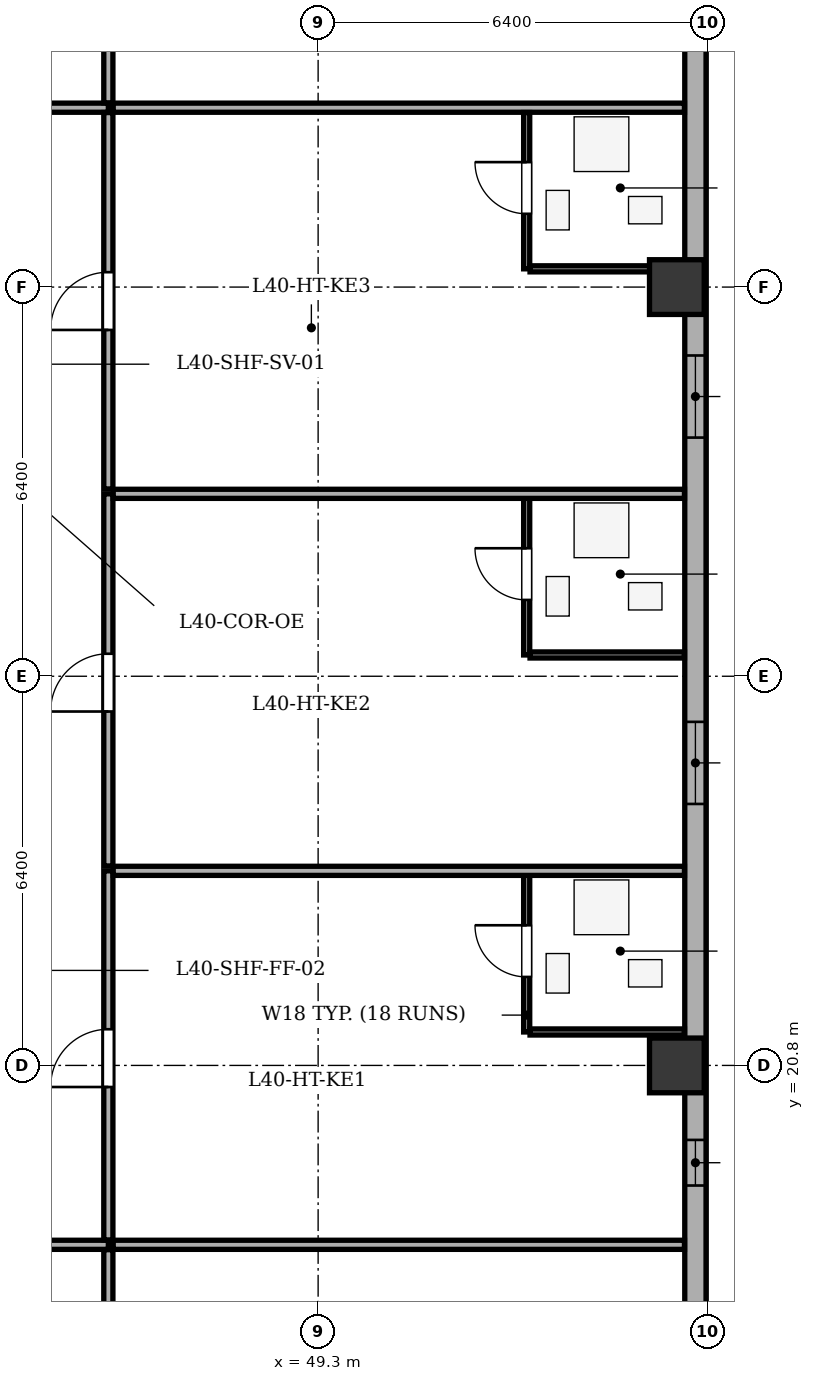
"""IFC4 building model, lengths in metres.
Left out: names, types, materials, properties, quantities, classifications, styles, units other than length and angle.
Written with IfcOpenShell. Run it as: python <this file> out.ifc"""

import sys

from ifc_helpers import new_model, si_unit, direction, frame, frame_2d, origin, origin_2d, place, context, subcontext, project, spatial, rectangle, extrude, element, fill, save


model = new_model("IFC4")
c1 = context("Model", 3, precision=1e-05, world=origin(), true_north=direction((0.0, 1.0)))
c2 = subcontext(c1, "Body", "Model", "MODEL_VIEW")
j1 = project(units=[si_unit("LENGTHUNIT", "METRE"), si_unit("PLANEANGLEUNIT", "RADIAN")], contexts=[c1])
p1 = place(None, origin())
s1 = spatial("IfcSite", under=j1, at=p1, CompositionType="ELEMENT")
p2 = place(p1, origin())
s2 = spatial("IfcBuilding", under=s1, at=p2, CompositionType="ELEMENT")
p3 = place(p2, frame((0.0, 0.0, 158.8)))
s3 = spatial("IfcBuildingStorey", under=s2, at=p3, CompositionType="ELEMENT", Elevation=158.8)
for number, where, z_axis, x_axis in (
    (1, (55.2, 20.8, 0.0), (0.0, 0.0, 1.0), (1.0, 0.0, 0.0)),
    (2, (55.2, 33.6, 0.0), (0.0, 0.0, 1.0), (1.0, 0.0, 0.0)),
):
    element("IfcColumn", number, at=place(p3, frame(where, z_axis=z_axis, x_axis=x_axis)), inside=s3, PredefinedType="COLUMN", context=c2, shape_type="SweptSolid", body=[
        extrude(rectangle(XDim=0.9, YDim=0.9, at=origin_2d()), origin(), (0.0, 0.0, 1.0), 3.5),
    ])
p4 = place(p3, frame((55.505, 41.5, 0.0), z_axis=(0.0, 0.0, 1.0), x_axis=(0.0, -1.0, 0.0)))
e3 = element("IfcWall", 3, at=p4, inside=s3, PredefinedType="STANDARD", context=c2, shape_type="SweptSolid", body=[
    extrude(rectangle(XDim=35.0, YDim=0.35, at=frame_2d((17.5, 0.0))), origin(), (0.0, 0.0, 1.0), 2.435),
])
p5 = place(p4, frame((1.813, 0.0, 0.75)))
e4 = element("IfcOpeningElement", 4, at=p5, cuts=e3, PredefinedType="OPENING", context=c2, shape_type="SweptSolid", body=[
    extrude(rectangle(XDim=1.6, YDim=1.565, at=frame_2d((0.8, 0.782))), frame((0.0, 0.185, 0.0), z_axis=(0.0, -1.0, 0.0), x_axis=(1.0, 0.0, 0.0)), (0.0, 0.0, 1.0), 0.37),
])
p6 = place(p4, frame((9.025, 0.0, 0.75)))
e5 = element("IfcOpeningElement", 5, at=p6, cuts=e3, PredefinedType="OPENING", context=c2, shape_type="SweptSolid", body=[
    extrude(rectangle(XDim=1.35, YDim=1.565, at=frame_2d((0.675, 0.782))), frame((0.0, 0.185, 0.0), z_axis=(0.0, -1.0, 0.0), x_axis=(1.0, 0.0, 0.0)), (0.0, 0.0, 1.0), 0.37),
])
p7 = place(p4, frame((15.05, 0.0, 0.75)))
e6 = element("IfcOpeningElement", 6, at=p7, cuts=e3, PredefinedType="OPENING", context=c2, shape_type="SweptSolid", body=[
    extrude(rectangle(XDim=1.35, YDim=1.565, at=frame_2d((0.675, 0.782))), frame((0.0, 0.185, 0.0), z_axis=(0.0, -1.0, 0.0), x_axis=(1.0, 0.0, 0.0)), (0.0, 0.0, 1.0), 0.37),
])
p8 = place(p4, frame((25.175, 0.0, 0.75)))
e7 = element("IfcOpeningElement", 7, at=p8, cuts=e3, PredefinedType="OPENING", context=c2, shape_type="SweptSolid", body=[
    extrude(rectangle(XDim=1.6, YDim=1.565, at=frame_2d((0.8, 0.782))), frame((0.0, 0.185, 0.0), z_axis=(0.0, -1.0, 0.0), x_axis=(1.0, 0.0, 0.0)), (0.0, 0.0, 1.0), 0.37),
])
p9 = place(p4, frame((31.012, 0.0, 0.75)))
e8 = element("IfcOpeningElement", 8, at=p9, cuts=e3, PredefinedType="OPENING", context=c2, shape_type="SweptSolid", body=[
    extrude(rectangle(XDim=1.6, YDim=1.565, at=frame_2d((0.8, 0.782))), frame((0.0, 0.185, 0.0), z_axis=(0.0, -1.0, 0.0), x_axis=(1.0, 0.0, 0.0)), (0.0, 0.0, 1.0), 0.37),
])
p10 = place(p4, frame((21.925, 0.0, 0.75)))
e9 = element("IfcOpeningElement", 9, at=p10, cuts=e3, PredefinedType="OPENING", context=c2, shape_type="SweptSolid", body=[
    extrude(rectangle(XDim=0.75, YDim=1.45, at=frame_2d((0.375, 0.725))), frame((0.0, 0.185, 0.0), z_axis=(0.0, -1.0, 0.0), x_axis=(1.0, 0.0, 0.0)), (0.0, 0.0, 1.0), 0.37),
])
p11 = place(p3, frame((42.073, 17.85, 0.0), z_axis=(0.0, 0.0, 1.0), x_axis=(1.0, 0.0, 0.0)))
e10 = element("IfcWall", 10, at=p11, inside=s3, PredefinedType="PARTITIONING", context=c2, shape_type="SweptSolid", body=[
    extrude(rectangle(XDim=3.777, YDim=0.15, at=frame_2d((1.889, 0.0))), origin(), (0.0, 0.0, 1.0), 3.05),
])
p12 = place(p11, frame((1.409, 0.0, 0.0)))
e11 = element("IfcOpeningElement", 11, at=p12, cuts=e10, PredefinedType="OPENING", context=c2, shape_type="SweptSolid", body=[
    extrude(rectangle(XDim=0.95, YDim=2.1, at=frame_2d((0.475, 1.05))), frame((0.0, 0.085, 0.0), z_axis=(0.0, -1.0, 0.0), x_axis=(1.0, 0.0, 0.0)), (0.0, 0.0, 1.0), 0.17),
])
p13 = place(p3, frame((45.85, 1.875, 0.0), z_axis=(0.0, 0.0, 1.0), x_axis=(0.0, 1.0, 0.0)))
e12 = element("IfcWall", 12, at=p13, inside=s3, PredefinedType="PARTITIONING", context=c2, shape_type="SweptSolid", body=[
    extrude(rectangle(XDim=15.895, YDim=0.15, at=frame_2d((7.948, 0.0))), origin(), (0.0, 0.0, 1.0), 3.05),
])
p14 = place(p3, frame((32.664, 36.55, 0.0), z_axis=(0.0, 0.0, 1.0), x_axis=(1.0, 0.0, 0.0)))
e13 = element("IfcWall", 13, at=p14, inside=s3, PredefinedType="PARTITIONING", context=c2, shape_type="SweptSolid", body=[
    extrude(rectangle(XDim=13.186, YDim=0.15, at=frame_2d((6.593, 0.0))), origin(), (0.0, 0.0, 1.0), 3.05),
])
p15 = place(p14, frame((6.033, 0.0, 0.0)))
e14 = element("IfcOpeningElement", 14, at=p15, cuts=e13, PredefinedType="OPENING", context=c2, shape_type="SweptSolid", body=[
    extrude(rectangle(XDim=1.0, YDim=2.1, at=frame_2d((0.5, 1.05))), frame((0.0, 0.085, 0.0), z_axis=(0.0, -1.0, 0.0), x_axis=(1.0, 0.0, 0.0)), (0.0, 0.0, 1.0), 0.17),
])
p16 = place(p3, frame((45.85, 36.63, 0.0), z_axis=(0.0, 0.0, 1.0), x_axis=(0.0, 1.0, 0.0)))
e15 = element("IfcWall", 15, at=p16, inside=s3, PredefinedType="PARTITIONING", context=c2, shape_type="SweptSolid", body=[
    extrude(rectangle(XDim=9.495, YDim=0.15, at=frame_2d((4.748, 0.0))), origin(), (0.0, 0.0, 1.0), 3.05),
])
for number, where, z_axis, x_axis in (
    (16, (45.93, 17.85, 0.0), (0.0, 0.0, 1.0), (1.0, 0.0, 0.0)),
    (17, (45.93, 36.55, 0.0), (0.0, 0.0, 1.0), (1.0, 0.0, 0.0)),
):
    element("IfcWall", number, at=place(p3, frame(where, z_axis=z_axis, x_axis=x_axis)), inside=s3, PredefinedType="PARTITIONING", context=c2, shape_type="SweptSolid", body=[
        extrude(rectangle(XDim=9.395, YDim=0.15, at=frame_2d((4.698, 0.0))), origin(), (0.0, 0.0, 1.0), 3.05),
    ])
p17 = place(p3, frame((45.85, 17.93, 0.0), z_axis=(0.0, 0.0, 1.0), x_axis=(0.0, 1.0, 0.0)))
e18 = element("IfcWall", 18, at=p17, inside=s3, PredefinedType="PARTITIONING", context=c2, shape_type="SweptSolid", body=[
    extrude(rectangle(XDim=6.07, YDim=0.15, at=frame_2d((3.035, 0.0))), origin(), (0.0, 0.0, 1.0), 3.05),
])
p18 = place(p17, frame((2.515, 0.0, 0.0)))
e19 = element("IfcOpeningElement", 19, at=p18, cuts=e18, PredefinedType="OPENING", context=c2, shape_type="SweptSolid", body=[
    extrude(rectangle(XDim=0.95, YDim=2.1, at=frame_2d((0.475, 1.05))), frame((0.0, 0.085, 0.0), z_axis=(0.0, -1.0, 0.0), x_axis=(1.0, 0.0, 0.0)), (0.0, 0.0, 1.0), 0.17),
])
p19 = place(p3, frame((52.73, 21.35, 0.0), z_axis=(0.0, 0.0, 1.0), x_axis=(0.0, 1.0, 0.0)))
e20 = element("IfcWall", 20, at=p19, inside=s3, PredefinedType="PARTITIONING", context=c2, shape_type="SweptSolid", body=[
    extrude(rectangle(XDim=2.65, YDim=0.1, at=frame_2d((1.325, 0.0))), origin(), (0.0, 0.0, 1.0), 3.05),
])
p20 = place(p19, frame((0.905, 0.0, 0.0)))
e21 = element("IfcOpeningElement", 21, at=p20, cuts=e20, PredefinedType="OPENING", context=c2, shape_type="SweptSolid", body=[
    extrude(rectangle(XDim=0.85, YDim=2.05, at=frame_2d((0.425, 1.025))), frame((0.0, 0.06, 0.0), z_axis=(0.0, -1.0, 0.0), x_axis=(1.0, 0.0, 0.0)), (0.0, 0.0, 1.0), 0.12),
])
p21 = place(p3, frame((52.785, 21.35, 0.0), z_axis=(0.0, 0.0, 1.0), x_axis=(1.0, 0.0, 0.0)))
e22 = element("IfcWall", 22, at=p21, inside=s3, PredefinedType="PARTITIONING", context=c2, shape_type="SweptSolid", body=[
    extrude(rectangle(XDim=2.54, YDim=0.1, at=frame_2d((1.27, 0.0))), origin(), (0.0, 0.0, 1.0), 3.05),
])
p22 = place(p3, frame((45.93, 24.0, 0.0), z_axis=(0.0, 0.0, 1.0), x_axis=(1.0, 0.0, 0.0)))
e23 = element("IfcWall", 23, at=p22, inside=s3, PredefinedType="PARTITIONING", context=c2, shape_type="SweptSolid", body=[
    extrude(rectangle(XDim=9.395, YDim=0.15, at=frame_2d((4.698, 0.0))), origin(), (0.0, 0.0, 1.0), 3.05),
])
p23 = place(p3, frame((45.85, 24.08, 0.0), z_axis=(0.0, 0.0, 1.0), x_axis=(0.0, 1.0, 0.0)))
e24 = element("IfcWall", 24, at=p23, inside=s3, PredefinedType="PARTITIONING", context=c2, shape_type="SweptSolid", body=[
    extrude(rectangle(XDim=6.12, YDim=0.15, at=frame_2d((3.06, 0.0))), origin(), (0.0, 0.0, 1.0), 3.05),
])
p24 = place(p23, frame((2.54, 0.0, 0.0)))
e25 = element("IfcOpeningElement", 25, at=p24, cuts=e24, PredefinedType="OPENING", context=c2, shape_type="SweptSolid", body=[
    extrude(rectangle(XDim=0.95, YDim=2.1, at=frame_2d((0.475, 1.05))), frame((0.0, 0.085, 0.0), z_axis=(0.0, -1.0, 0.0), x_axis=(1.0, 0.0, 0.0)), (0.0, 0.0, 1.0), 0.17),
])
p25 = place(p3, frame((52.73, 27.55, 0.0), z_axis=(0.0, 0.0, 1.0), x_axis=(0.0, 1.0, 0.0)))
e26 = element("IfcWall", 26, at=p25, inside=s3, PredefinedType="PARTITIONING", context=c2, shape_type="SweptSolid", body=[
    extrude(rectangle(XDim=2.65, YDim=0.1, at=frame_2d((1.325, 0.0))), origin(), (0.0, 0.0, 1.0), 3.05),
])
p26 = place(p25, frame((0.905, 0.0, 0.0)))
e27 = element("IfcOpeningElement", 27, at=p26, cuts=e26, PredefinedType="OPENING", context=c2, shape_type="SweptSolid", body=[
    extrude(rectangle(XDim=0.85, YDim=2.05, at=frame_2d((0.425, 1.025))), frame((0.0, 0.06, 0.0), z_axis=(0.0, -1.0, 0.0), x_axis=(1.0, 0.0, 0.0)), (0.0, 0.0, 1.0), 0.12),
])
p27 = place(p3, frame((52.785, 27.55, 0.0), z_axis=(0.0, 0.0, 1.0), x_axis=(1.0, 0.0, 0.0)))
e28 = element("IfcWall", 28, at=p27, inside=s3, PredefinedType="PARTITIONING", context=c2, shape_type="SweptSolid", body=[
    extrude(rectangle(XDim=2.54, YDim=0.1, at=frame_2d((1.27, 0.0))), origin(), (0.0, 0.0, 1.0), 3.05),
])
p28 = place(p3, frame((45.93, 30.2, 0.0), z_axis=(0.0, 0.0, 1.0), x_axis=(1.0, 0.0, 0.0)))
e29 = element("IfcWall", 29, at=p28, inside=s3, PredefinedType="PARTITIONING", context=c2, shape_type="SweptSolid", body=[
    extrude(rectangle(XDim=9.395, YDim=0.15, at=frame_2d((4.698, 0.0))), origin(), (0.0, 0.0, 1.0), 3.05),
])
p29 = place(p3, frame((45.85, 30.28, 0.0), z_axis=(0.0, 0.0, 1.0), x_axis=(0.0, 1.0, 0.0)))
e30 = element("IfcWall", 30, at=p29, inside=s3, PredefinedType="PARTITIONING", context=c2, shape_type="SweptSolid", body=[
    extrude(rectangle(XDim=6.19, YDim=0.15, at=frame_2d((3.095, 0.0))), origin(), (0.0, 0.0, 1.0), 3.05),
])
p30 = place(p29, frame((2.615, 0.0, 0.0)))
e31 = element("IfcOpeningElement", 31, at=p30, cuts=e30, PredefinedType="OPENING", context=c2, shape_type="SweptSolid", body=[
    extrude(rectangle(XDim=0.95, YDim=2.1, at=frame_2d((0.475, 1.05))), frame((0.0, 0.085, 0.0), z_axis=(0.0, -1.0, 0.0), x_axis=(1.0, 0.0, 0.0)), (0.0, 0.0, 1.0), 0.17),
])
p31 = place(p3, frame((52.73, 33.9, 0.0), z_axis=(0.0, 0.0, 1.0), x_axis=(0.0, 1.0, 0.0)))
e32 = element("IfcWall", 32, at=p31, inside=s3, PredefinedType="PARTITIONING", context=c2, shape_type="SweptSolid", body=[
    extrude(rectangle(XDim=2.57, YDim=0.1, at=frame_2d((1.285, 0.0))), origin(), (0.0, 0.0, 1.0), 3.05),
])
p32 = place(p31, frame((0.905, 0.0, 0.0)))
e33 = element("IfcOpeningElement", 33, at=p32, cuts=e32, PredefinedType="OPENING", context=c2, shape_type="SweptSolid", body=[
    extrude(rectangle(XDim=0.85, YDim=2.05, at=frame_2d((0.425, 1.025))), frame((0.0, 0.06, 0.0), z_axis=(0.0, -1.0, 0.0), x_axis=(1.0, 0.0, 0.0)), (0.0, 0.0, 1.0), 0.12),
])
p33 = place(p3, frame((52.785, 33.9, 0.0), z_axis=(0.0, 0.0, 1.0), x_axis=(1.0, 0.0, 0.0)))
e34 = element("IfcWall", 34, at=p33, inside=s3, PredefinedType="PARTITIONING", context=c2, shape_type="SweptSolid", body=[
    extrude(rectangle(XDim=2.54, YDim=0.1, at=frame_2d((1.27, 0.0))), origin(), (0.0, 0.0, 1.0), 3.05),
])
p34 = place(p6, origin())
e35 = element("IfcWindow", 35, at=p34, inside=s3, PartitioningType="SINGLE_PANEL", PredefinedType="WINDOW", context=c2, shape_type="SweptSolid", body=[
    extrude(rectangle(XDim=1.35, YDim=1.565, at=frame_2d((0.675, 0.782))), frame((0.0, -0.01, 0.0), z_axis=(0.0, -1.0, 0.0), x_axis=(1.0, 0.0, 0.0)), (0.0, 0.0, 1.0), 0.06),
])
fill(e5, e35)
p35 = place(p7, origin())
e36 = element("IfcWindow", 36, at=p35, inside=s3, PartitioningType="SINGLE_PANEL", PredefinedType="WINDOW", context=c2, shape_type="SweptSolid", body=[
    extrude(rectangle(XDim=1.35, YDim=1.565, at=frame_2d((0.675, 0.782))), frame((0.0, -0.01, 0.0), z_axis=(0.0, -1.0, 0.0), x_axis=(1.0, 0.0, 0.0)), (0.0, 0.0, 1.0), 0.06),
])
fill(e6, e36)
p36 = place(p10, origin())
e37 = element("IfcWindow", 37, at=p36, inside=s3, PartitioningType="SINGLE_PANEL", PredefinedType="WINDOW", context=c2, shape_type="SweptSolid", body=[
    extrude(rectangle(XDim=0.75, YDim=1.45, at=frame_2d((0.375, 0.725))), frame((0.0, -0.01, 0.0), z_axis=(0.0, -1.0, 0.0), x_axis=(1.0, 0.0, 0.0)), (0.0, 0.0, 1.0), 0.06),
])
fill(e9, e37)
p37 = place(p20, origin())
e38 = element("IfcDoor", 38, at=p37, inside=s3, OperationType="SINGLE_SWING_RIGHT", PredefinedType="DOOR", context=c2, shape_type="SweptSolid", body=[
    extrude(rectangle(XDim=0.85, YDim=2.05, at=frame_2d((0.425, 1.025))), frame((0.0, 0.025, 0.0), z_axis=(0.0, -1.0, 0.0), x_axis=(1.0, 0.0, 0.0)), (0.0, 0.0, 1.0), 0.05),
])
fill(e21, e38)
p38 = place(p18, origin())
e39 = element("IfcDoor", 39, at=p38, inside=s3, OperationType="SINGLE_SWING_LEFT", PredefinedType="DOOR", context=c2, shape_type="SweptSolid", body=[
    extrude(rectangle(XDim=0.95, YDim=2.1, at=frame_2d((0.475, 1.05))), frame((0.0, 0.025, 0.0), z_axis=(0.0, -1.0, 0.0), x_axis=(1.0, 0.0, 0.0)), (0.0, 0.0, 1.0), 0.05),
])
fill(e19, e39)
p39 = place(p26, origin())
e40 = element("IfcDoor", 40, at=p39, inside=s3, OperationType="SINGLE_SWING_RIGHT", PredefinedType="DOOR", context=c2, shape_type="SweptSolid", body=[
    extrude(rectangle(XDim=0.85, YDim=2.05, at=frame_2d((0.425, 1.025))), frame((0.0, 0.025, 0.0), z_axis=(0.0, -1.0, 0.0), x_axis=(1.0, 0.0, 0.0)), (0.0, 0.0, 1.0), 0.05),
])
fill(e27, e40)
p40 = place(p24, origin())
e41 = element("IfcDoor", 41, at=p40, inside=s3, OperationType="SINGLE_SWING_LEFT", PredefinedType="DOOR", context=c2, shape_type="SweptSolid", body=[
    extrude(rectangle(XDim=0.95, YDim=2.1, at=frame_2d((0.475, 1.05))), frame((0.0, 0.025, 0.0), z_axis=(0.0, -1.0, 0.0), x_axis=(1.0, 0.0, 0.0)), (0.0, 0.0, 1.0), 0.05),
])
fill(e25, e41)
p41 = place(p32, origin())
e42 = element("IfcDoor", 42, at=p41, inside=s3, OperationType="SINGLE_SWING_RIGHT", PredefinedType="DOOR", context=c2, shape_type="SweptSolid", body=[
    extrude(rectangle(XDim=0.85, YDim=2.05, at=frame_2d((0.425, 1.025))), frame((0.0, 0.025, 0.0), z_axis=(0.0, -1.0, 0.0), x_axis=(1.0, 0.0, 0.0)), (0.0, 0.0, 1.0), 0.05),
])
fill(e33, e42)
p42 = place(p30, origin())
e43 = element("IfcDoor", 43, at=p42, inside=s3, OperationType="SINGLE_SWING_LEFT", PredefinedType="DOOR", context=c2, shape_type="SweptSolid", body=[
    extrude(rectangle(XDim=0.95, YDim=2.1, at=frame_2d((0.475, 1.05))), frame((0.0, 0.025, 0.0), z_axis=(0.0, -1.0, 0.0), x_axis=(1.0, 0.0, 0.0)), (0.0, 0.0, 1.0), 0.05),
])
fill(e31, e43)
save(model, sys.argv[1])
